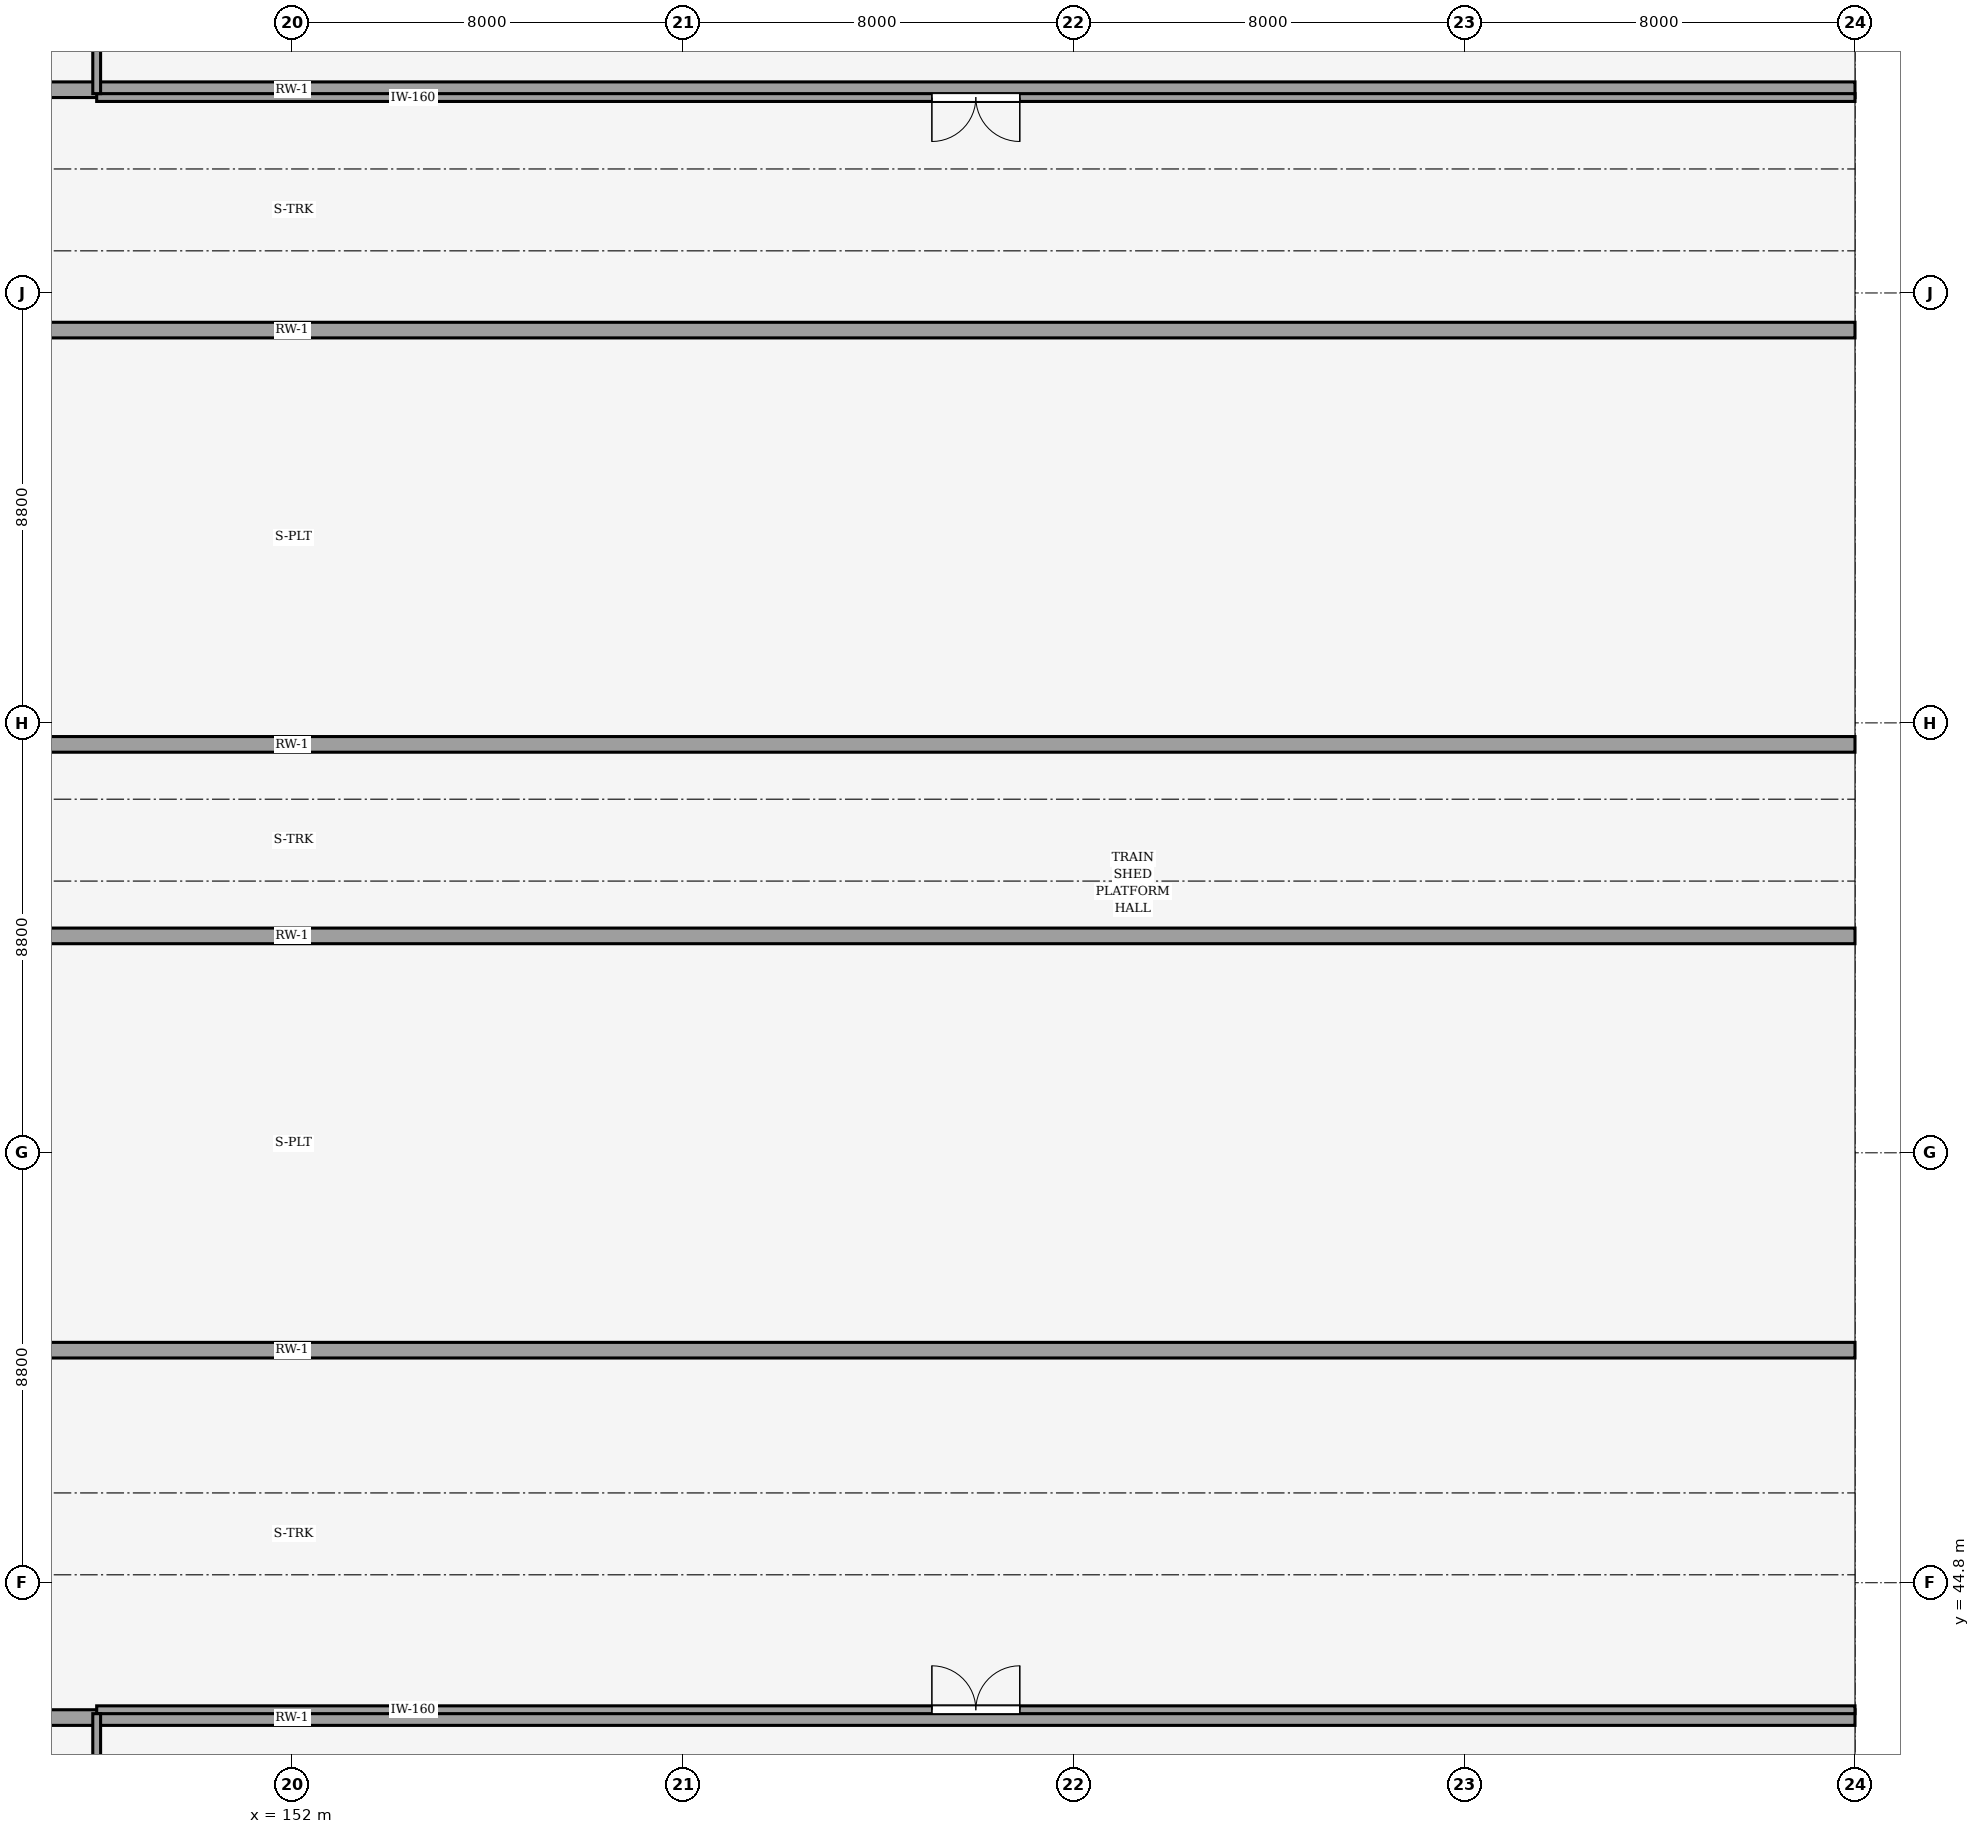
"""IFC4 building model, lengths in metres.
Left out: names, types, materials, properties, quantities, classifications, styles, units other than length and angle.
Written with IfcOpenShell. Run it as: python <this file> out.ifc"""

import sys

from ifc_helpers import new_model, si_unit, direction, frame, frame_2d, origin, place, context, subcontext, project, spatial, rectangle, extrude, element, fill, save


model = new_model("IFC4")
c1 = context("Model", 3, precision=1e-05, world=origin(), true_north=direction((0.0, 1.0)))
c2 = subcontext(c1, "Body", "Model", "MODEL_VIEW")
j1 = project(units=[si_unit("LENGTHUNIT", "METRE"), si_unit("PLANEANGLEUNIT", "RADIAN")], contexts=[c1])
p1 = place(None, origin())
s1 = spatial("IfcSite", under=j1, at=p1, CompositionType="ELEMENT")
p2 = place(p1, origin())
s2 = spatial("IfcBuilding", under=s1, at=p2, CompositionType="ELEMENT")
p3 = place(p2, origin())
s3 = spatial("IfcBuildingStorey", under=s2, at=p3, CompositionType="ELEMENT", Elevation=0.0)
for number, where, z_axis, x_axis in (
    (1, (120.0, 42.04, -1.255), (0.0, 0.0, 1.0), (1.0, 0.0, 0.0)),
    (2, (120.0, 49.56, -1.255), (0.0, 0.0, 1.0), (1.0, 0.0, 0.0)),
    (3, (120.0, 58.04, -1.255), (0.0, 0.0, 1.0), (1.0, 0.0, 0.0)),
    (4, (120.0, 61.96, -1.255), (0.0, 0.0, 1.0), (1.0, 0.0, 0.0)),
    (5, (120.0, 70.44, -1.255), (0.0, 0.0, 1.0), (1.0, 0.0, 0.0)),
    (6, (120.0, 75.36, -1.255), (0.0, 0.0, 1.0), (1.0, 0.0, 0.0)),
):
    element("IfcWall", number, at=place(p3, frame(where, z_axis=z_axis, x_axis=x_axis)), inside=s3, PredefinedType="USERDEFINED", context=c2, shape_type="SweptSolid", body=[
        extrude(rectangle(XDim=64.0, YDim=0.32, at=frame_2d((32.0, 0.0))), origin(), (0.0, 0.0, 1.0), 0.905),
    ])
p4 = place(p3, frame((148.0, 42.2, 0.0), z_axis=(0.0, 0.0, 1.0), x_axis=(1.0, 0.0, 0.0)))
e7 = element("IfcWall", 7, at=p4, inside=s3, PredefinedType="PARTITIONING", context=c2, shape_type="SweptSolid", body=[
    extrude(rectangle(XDim=36.0, YDim=0.16, at=frame_2d((18.0, 0.0))), origin(), (0.0, 0.0, 1.0), 3.7),
])
p5 = place(p4, frame((17.1, 0.0, 0.0)))
e8 = element("IfcOpeningElement", 8, at=p5, cuts=e7, PredefinedType="OPENING", context=c2, shape_type="SweptSolid", body=[
    extrude(rectangle(XDim=1.8, YDim=2.25, at=frame_2d((0.9, 1.125))), frame((0.0, 0.09, 0.0), z_axis=(0.0, -1.0, 0.0), x_axis=(1.0, 0.0, 0.0)), (0.0, 0.0, 1.0), 0.18),
])
p6 = place(p3, frame((148.0, 36.16, 0.0), z_axis=(0.0, 0.0, 1.0), x_axis=(0.0, 1.0, 0.0)))
e9 = element("IfcWall", 9, at=p6, inside=s3, PredefinedType="PARTITIONING", context=c2, shape_type="SweptSolid", body=[
    extrude(rectangle(XDim=5.96, YDim=0.16, at=frame_2d((2.98, 0.0))), origin(), (0.0, 0.0, 1.0), 3.11),
])
p7 = place(p3, frame((148.0, 75.2, 0.0), z_axis=(0.0, 0.0, 1.0), x_axis=(1.0, 0.0, 0.0)))
e10 = element("IfcWall", 10, at=p7, inside=s3, PredefinedType="PARTITIONING", context=c2, shape_type="SweptSolid", body=[
    extrude(rectangle(XDim=36.0, YDim=0.16, at=frame_2d((18.0, 0.0))), origin(), (0.0, 0.0, 1.0), 3.7),
])
p8 = place(p7, frame((17.1, 0.0, 0.0)))
e11 = element("IfcOpeningElement", 11, at=p8, cuts=e10, PredefinedType="OPENING", context=c2, shape_type="SweptSolid", body=[
    extrude(rectangle(XDim=1.8, YDim=2.25, at=frame_2d((0.9, 1.125))), frame((0.0, 0.09, 0.0), z_axis=(0.0, -1.0, 0.0), x_axis=(1.0, 0.0, 0.0)), (0.0, 0.0, 1.0), 0.18),
])
p9 = place(p3, frame((148.0, 75.28, 0.0), z_axis=(0.0, 0.0, 1.0), x_axis=(0.0, 1.0, 0.0)))
e12 = element("IfcWall", 12, at=p9, inside=s3, PredefinedType="PARTITIONING", context=c2, shape_type="SweptSolid", body=[
    extrude(rectangle(XDim=4.56, YDim=0.16, at=frame_2d((2.28, 0.0))), origin(), (0.0, 0.0, 1.0), 3.11),
])
p10 = place(p5, origin())
e13 = element("IfcDoor", 13, at=p10, inside=s3, OperationType="DOUBLE_DOOR_SINGLE_SWING", PredefinedType="DOOR", context=c2, shape_type="SweptSolid", body=[
    extrude(rectangle(XDim=1.8, YDim=2.25, at=frame_2d((0.9, 1.125))), frame((0.0, 0.025, 0.0), z_axis=(0.0, -1.0, 0.0), x_axis=(1.0, 0.0, 0.0)), (0.0, 0.0, 1.0), 0.05),
])
fill(e8, e13)
p11 = place(p8, frame((1.8, 0.0, 0.0), z_axis=(0.0, 0.0, 1.0), x_axis=(-1.0, 0.0, 0.0)))
e14 = element("IfcDoor", 14, at=p11, inside=s3, OperationType="DOUBLE_DOOR_SINGLE_SWING", PredefinedType="DOOR", context=c2, shape_type="SweptSolid", body=[
    extrude(rectangle(XDim=1.8, YDim=2.25, at=frame_2d((0.9, 1.125))), frame((0.0, 0.025, 0.0), z_axis=(0.0, -1.0, 0.0), x_axis=(1.0, 0.0, 0.0)), (0.0, 0.0, 1.0), 0.05),
])
fill(e11, e14)
save(model, sys.argv[1])
